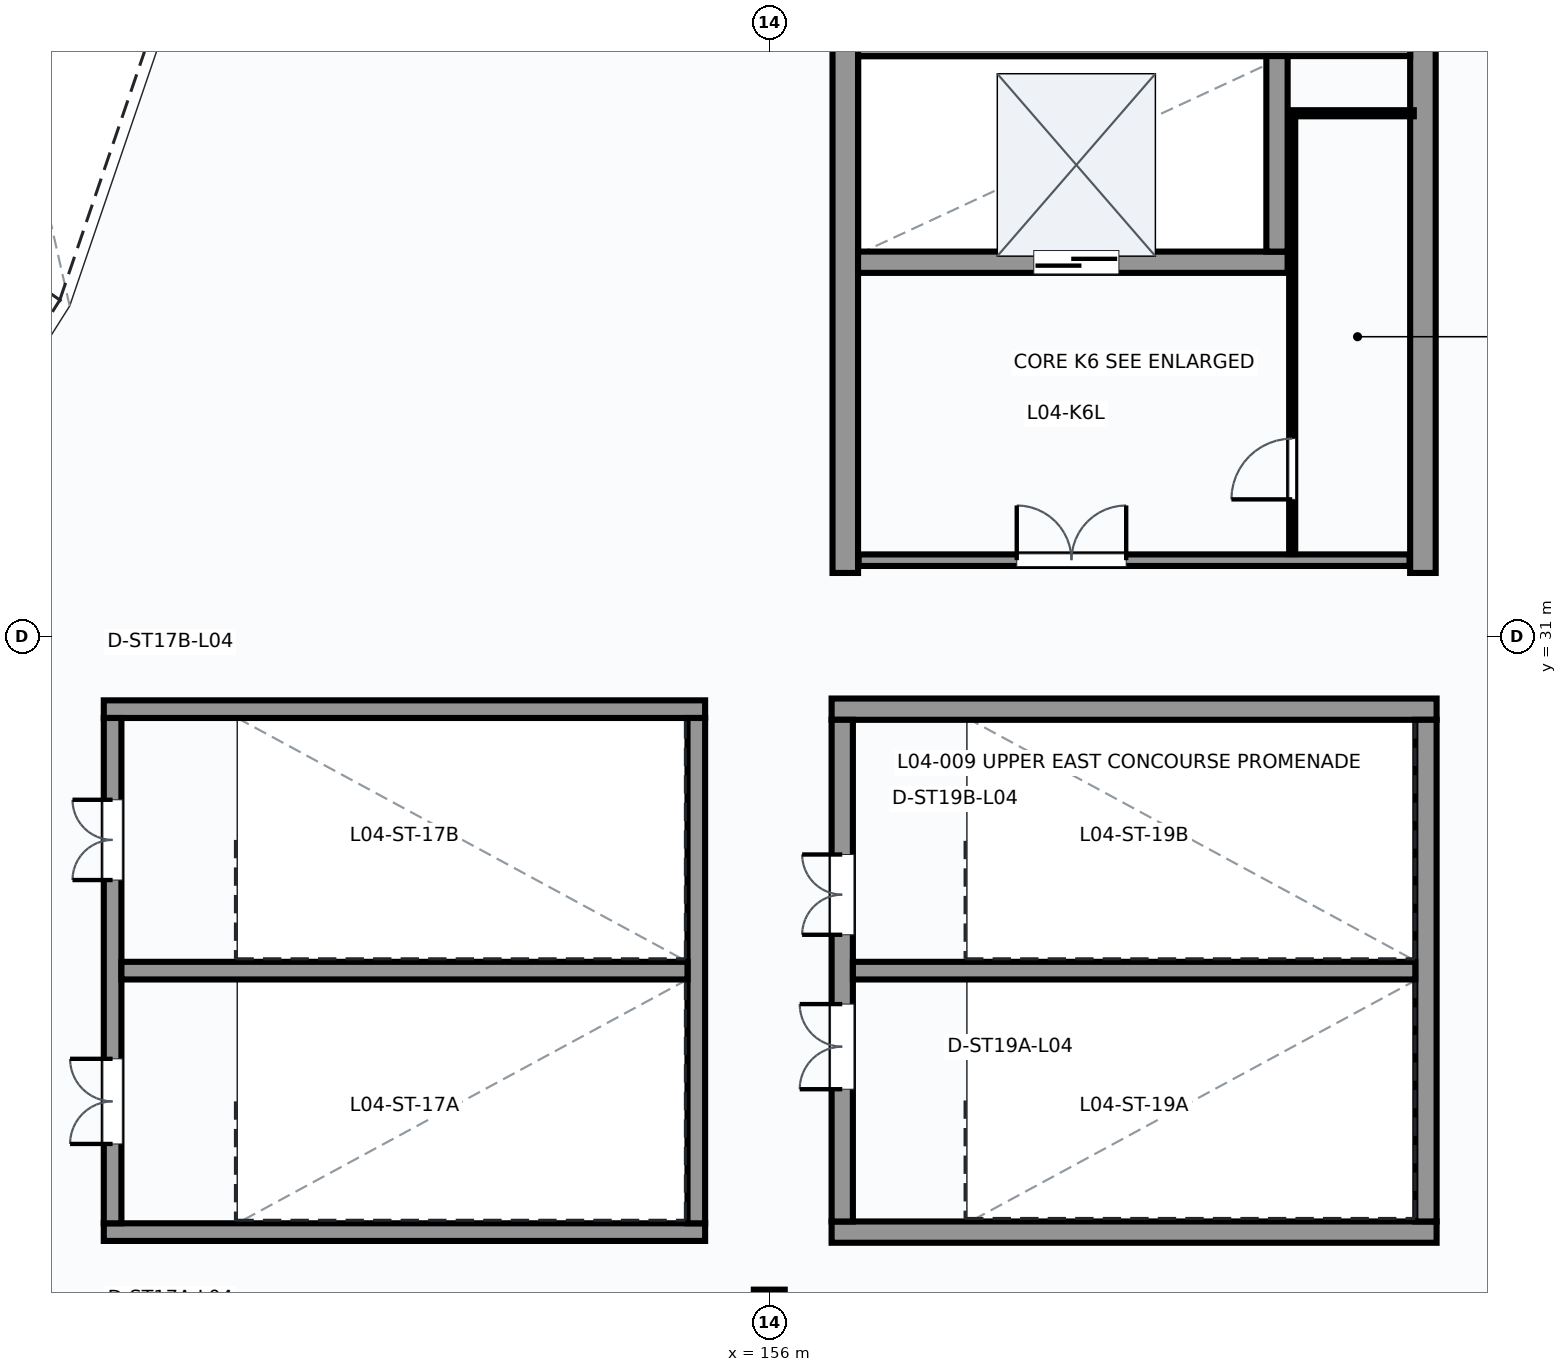
"""IFC4 building model, lengths in metres.
Left out: names, types, materials, properties, quantities, classifications, styles, units other than length and angle.
Written with IfcOpenShell. Run it as: python <this file> out.ifc"""

import sys

from ifc_helpers import new_model, si_unit, direction, frame, frame_2d, origin, origin_2d, place, context, subcontext, project, spatial, rectangle, hollow_circle, extrude, element, fill, save


model = new_model("IFC4")
c1 = context("Model", 3, precision=1e-05, world=origin(), true_north=direction((0.0, 1.0)))
c2 = subcontext(c1, "Body", "Model", "MODEL_VIEW")
j1 = project(units=[si_unit("LENGTHUNIT", "METRE"), si_unit("PLANEANGLEUNIT", "RADIAN")], contexts=[c1])
p1 = place(None, origin())
s1 = spatial("IfcSite", under=j1, at=p1, CompositionType="ELEMENT")
p2 = place(p1, origin())
s2 = spatial("IfcBuilding", under=s1, at=p2, CompositionType="ELEMENT")
p3 = place(p2, frame((0.0, 0.0, 19.2)))
s3 = spatial("IfcBuildingStorey", under=s2, at=p3, CompositionType="ELEMENT", Elevation=19.2)
p4 = place(p3, frame((156.0, 20.0, 0.0), z_axis=(0.0, 0.0, 1.0), x_axis=(1.0, 0.0, 0.0)))
e1 = element("IfcColumn", 1, at=p4, inside=s3, PredefinedType="COLUMN", context=c2, shape_type="SweptSolid", body=[
    extrude(hollow_circle(Radius=0.254, WallThickness=0.02, at=origin_2d()), origin(), (0.0, 0.0, 1.0), 5.4),
])
for number, where, z_axis, x_axis in (
    (2, (145.055, 21.2, 0.0), (0.0, 0.0, 1.0), (1.0, 0.0, 0.0)),
    (3, (145.055, 29.8, 0.0), (0.0, 0.0, 1.0), (1.0, 0.0, 0.0)),
):
    element("IfcWall", number, at=place(p3, frame(where, z_axis=z_axis, x_axis=x_axis)), inside=s3, PredefinedType="SHEAR", context=c2, shape_type="SweptSolid", body=[
        extrude(rectangle(XDim=9.89, YDim=0.29, at=frame_2d((4.945, 0.0))), origin(), (0.0, 0.0, 1.0), 5.4),
    ])
p5 = place(p3, frame((145.2, 21.345, 0.0), z_axis=(0.0, 0.0, 1.0), x_axis=(0.0, 1.0, 0.0)))
e4 = element("IfcWall", 4, at=p5, inside=s3, PredefinedType="SHEAR", context=c2, shape_type="SweptSolid", body=[
    extrude(rectangle(XDim=8.31, YDim=0.29, at=frame_2d((4.155, 0.0))), origin(), (0.0, 0.0, 1.0), 5.4),
])
p6 = place(p5, frame((1.305, 0.0, 0.0)))
e5 = element("IfcOpeningElement", 5, at=p6, cuts=e4, PredefinedType="OPENING", context=c2, shape_type="SweptSolid", body=[
    extrude(rectangle(XDim=1.4, YDim=2.2, at=frame_2d((0.7, 1.1))), frame((0.0, 0.155, 0.0), z_axis=(0.0, -1.0, 0.0), x_axis=(1.0, 0.0, 0.0)), (0.0, 0.0, 1.0), 0.31),
])
p7 = place(p5, frame((5.645, 0.0, 0.0)))
e6 = element("IfcOpeningElement", 6, at=p7, cuts=e4, PredefinedType="OPENING", context=c2, shape_type="SweptSolid", body=[
    extrude(rectangle(XDim=1.32, YDim=2.2, at=frame_2d((0.66, 1.1))), frame((0.0, 0.155, 0.0), z_axis=(0.0, -1.0, 0.0), x_axis=(1.0, 0.0, 0.0)), (0.0, 0.0, 1.0), 0.31),
])
p8 = place(p3, frame((154.8, 21.345, 0.0), z_axis=(0.0, 0.0, 1.0), x_axis=(0.0, 1.0, 0.0)))
e7 = element("IfcWall", 7, at=p8, inside=s3, PredefinedType="SHEAR", context=c2, shape_type="SweptSolid", body=[
    extrude(rectangle(XDim=8.31, YDim=0.29, at=frame_2d((4.155, 0.0))), origin(), (0.0, 0.0, 1.0), 5.4),
])
p9 = place(p3, frame((145.345, 25.5, 0.0), z_axis=(0.0, 0.0, 1.0), x_axis=(1.0, 0.0, 0.0)))
e8 = element("IfcWall", 8, at=p9, inside=s3, PredefinedType="SHEAR", context=c2, shape_type="SweptSolid", body=[
    extrude(rectangle(XDim=9.31, YDim=0.29, at=frame_2d((4.655, 0.0))), origin(), (0.0, 0.0, 1.0), 5.4),
])
for number, where, z_axis, x_axis in (
    (9, (157.025, 21.2, 0.0), (0.0, 0.0, 1.0), (1.0, 0.0, 0.0)),
    (10, (157.025, 29.8, 0.0), (0.0, 0.0, 1.0), (1.0, 0.0, 0.0)),
):
    element("IfcWall", number, at=place(p3, frame(where, z_axis=z_axis, x_axis=x_axis)), inside=s3, PredefinedType="SHEAR", context=c2, shape_type="SweptSolid", body=[
        extrude(rectangle(XDim=9.95, YDim=0.35, at=frame_2d((4.975, 0.0))), origin(), (0.0, 0.0, 1.0), 5.4),
    ])
p10 = place(p3, frame((157.2, 21.375, 0.0), z_axis=(0.0, 0.0, 1.0), x_axis=(0.0, 1.0, 0.0)))
e11 = element("IfcWall", 11, at=p10, inside=s3, PredefinedType="SHEAR", context=c2, shape_type="SweptSolid", body=[
    extrude(rectangle(XDim=8.25, YDim=0.35, at=frame_2d((4.125, 0.0))), origin(), (0.0, 0.0, 1.0), 5.4),
])
p11 = place(p10, frame((2.175, 0.0, 0.0)))
e12 = element("IfcOpeningElement", 12, at=p11, cuts=e11, PredefinedType="OPENING", context=c2, shape_type="SweptSolid", body=[
    extrude(rectangle(XDim=1.4, YDim=2.2, at=frame_2d((0.7, 1.1))), frame((0.0, 0.185, 0.0), z_axis=(0.0, -1.0, 0.0), x_axis=(1.0, 0.0, 0.0)), (0.0, 0.0, 1.0), 0.37),
])
p12 = place(p10, frame((4.715, 0.0, 0.0)))
e13 = element("IfcOpeningElement", 13, at=p12, cuts=e11, PredefinedType="OPENING", context=c2, shape_type="SweptSolid", body=[
    extrude(rectangle(XDim=1.32, YDim=2.2, at=frame_2d((0.66, 1.1))), frame((0.0, 0.185, 0.0), z_axis=(0.0, -1.0, 0.0), x_axis=(1.0, 0.0, 0.0)), (0.0, 0.0, 1.0), 0.37),
])
p13 = place(p3, frame((166.8, 21.375, 0.0), z_axis=(0.0, 0.0, 1.0), x_axis=(0.0, 1.0, 0.0)))
e14 = element("IfcWall", 14, at=p13, inside=s3, PredefinedType="SHEAR", context=c2, shape_type="SweptSolid", body=[
    extrude(rectangle(XDim=8.25, YDim=0.35, at=frame_2d((4.125, 0.0))), origin(), (0.0, 0.0, 1.0), 5.4),
])
p14 = place(p3, frame((157.375, 25.5, 0.0), z_axis=(0.0, 0.0, 1.0), x_axis=(1.0, 0.0, 0.0)))
e15 = element("IfcWall", 15, at=p14, inside=s3, PredefinedType="SHEAR", context=c2, shape_type="SweptSolid", body=[
    extrude(rectangle(XDim=9.25, YDim=0.29, at=frame_2d((4.625, 0.0))), origin(), (0.0, 0.0, 1.0), 5.4),
])
for number, where, z_axis, x_axis in (
    (16, (157.25, 32.04, 0.0), (0.0, 0.0, 1.0), (0.0, 1.0, 0.0)),
    (17, (166.75, 32.04, 0.0), (0.0, 0.0, 1.0), (0.0, 1.0, 0.0)),
):
    element("IfcWall", number, at=place(p3, frame(where, z_axis=z_axis, x_axis=x_axis)), inside=s3, PredefinedType="SHEAR", context=c2, shape_type="SweptSolid", body=[
        extrude(rectangle(XDim=8.92, YDim=0.42, at=frame_2d((4.46, 0.0))), origin(), (0.0, 0.0, 1.0), 5.4),
    ])
p15 = place(p3, frame((157.46, 40.75, 0.0), z_axis=(0.0, 0.0, 1.0), x_axis=(1.0, 0.0, 0.0)))
e18 = element("IfcWall", 18, at=p15, inside=s3, PredefinedType="SHEAR", context=c2, shape_type="SweptSolid", body=[
    extrude(rectangle(XDim=9.08, YDim=0.42, at=frame_2d((4.54, 0.0))), origin(), (0.0, 0.0, 1.0), 5.4),
])
p16 = place(p3, frame((157.46, 37.15, 0.0), z_axis=(0.0, 0.0, 1.0), x_axis=(1.0, 0.0, 0.0)))
e19 = element("IfcWall", 19, at=p16, inside=s3, PredefinedType="SHEAR", context=c2, shape_type="SweptSolid", body=[
    extrude(rectangle(XDim=7.065, YDim=0.35, at=frame_2d((3.532, 0.0))), origin(), (0.0, 0.0, 1.0), 5.4),
])
p17 = place(p16, frame((2.89, 0.0, 0.0)))
e20 = element("IfcOpeningElement", 20, at=p17, cuts=e19, PredefinedType="OPENING", context=c2, shape_type="SweptSolid", body=[
    extrude(rectangle(XDim=1.4, YDim=2.3, at=frame_2d((0.7, 1.15))), frame((0.0, 0.185, 0.0), z_axis=(0.0, -1.0, 0.0), x_axis=(1.0, 0.0, 0.0)), (0.0, 0.0, 1.0), 0.37),
])
p18 = place(p3, frame((164.35, 37.325, 0.0), z_axis=(0.0, 0.0, 1.0), x_axis=(0.0, 1.0, 0.0)))
e21 = element("IfcWall", 21, at=p18, inside=s3, PredefinedType="SHEAR", context=c2, shape_type="SweptSolid", body=[
    extrude(rectangle(XDim=3.215, YDim=0.35, at=frame_2d((1.607, 0.0))), origin(), (0.0, 0.0, 1.0), 5.4),
])
p19 = place(p3, frame((157.47, 32.25, 0.0), z_axis=(0.0, 0.0, 1.0), x_axis=(1.0, 0.0, 0.0)))
e22 = element("IfcWall", 22, at=p19, inside=s3, PredefinedType="PARTITIONING", context=c2, shape_type="SweptSolid", body=[
    extrude(rectangle(XDim=9.06, YDim=0.19, at=frame_2d((4.53, 0.0))), origin(), (0.0, 0.0, 1.0), 5.07),
])
p20 = place(p19, frame((2.6, 0.0, 0.0)))
e23 = element("IfcOpeningElement", 23, at=p20, cuts=e22, PredefinedType="OPENING", context=c2, shape_type="SweptSolid", body=[
    extrude(rectangle(XDim=1.8, YDim=2.3, at=frame_2d((0.9, 1.15))), frame((0.0, 0.105, 0.0), z_axis=(0.0, -1.0, 0.0), x_axis=(1.0, 0.0, 0.0)), (0.0, 0.0, 1.0), 0.21),
])
p21 = place(p3, frame((164.6, 32.35, 0.0), z_axis=(0.0, 0.0, 1.0), x_axis=(0.0, 1.0, 0.0)))
e24 = element("IfcWall", 24, at=p21, inside=s3, PredefinedType="PARTITIONING", context=c2, shape_type="SweptSolid", body=[
    extrude(rectangle(XDim=7.25, YDim=0.1, at=frame_2d((3.625, 0.0))), origin(), (0.0, 0.0, 1.0), 5.07),
])
p22 = place(p21, frame((0.9, 0.0, 0.0)))
e25 = element("IfcOpeningElement", 25, at=p22, cuts=e24, PredefinedType="OPENING", context=c2, shape_type="SweptSolid", body=[
    extrude(rectangle(XDim=1.0, YDim=2.1, at=frame_2d((0.5, 1.05))), frame((0.0, 0.06, 0.0), z_axis=(0.0, -1.0, 0.0), x_axis=(1.0, 0.0, 0.0)), (0.0, 0.0, 1.0), 0.12),
])
p23 = place(p3, frame((164.6, 39.6, 0.0), z_axis=(0.0, 0.0, 1.0), x_axis=(1.0, 0.0, 0.0)))
e26 = element("IfcWall", 26, at=p23, inside=s3, PredefinedType="PARTITIONING", context=c2, shape_type="SweptSolid", body=[
    extrude(rectangle(XDim=2.0, YDim=0.1, at=frame_2d((1.0, 0.0))), origin(), (0.0, 0.0, 1.0), 5.07),
])
p24 = place(p6, origin())
e27 = element("IfcDoor", 27, at=p24, inside=s3, OperationType="DOUBLE_DOOR_SINGLE_SWING", PredefinedType="DOOR", context=c2, shape_type="SweptSolid", body=[
    extrude(rectangle(XDim=1.4, YDim=2.2, at=frame_2d((0.7, 1.1))), frame((0.0, 0.025, 0.0), z_axis=(0.0, -1.0, 0.0), x_axis=(1.0, 0.0, 0.0)), (0.0, 0.0, 1.0), 0.05),
])
fill(e5, e27)
p25 = place(p7, origin())
e28 = element("IfcDoor", 28, at=p25, inside=s3, OperationType="DOUBLE_DOOR_SINGLE_SWING", PredefinedType="DOOR", context=c2, shape_type="SweptSolid", body=[
    extrude(rectangle(XDim=1.32, YDim=2.2, at=frame_2d((0.66, 1.1))), frame((0.0, 0.025, 0.0), z_axis=(0.0, -1.0, 0.0), x_axis=(1.0, 0.0, 0.0)), (0.0, 0.0, 1.0), 0.05),
])
fill(e6, e28)
p26 = place(p11, origin())
e29 = element("IfcDoor", 29, at=p26, inside=s3, OperationType="DOUBLE_DOOR_SINGLE_SWING", PredefinedType="DOOR", context=c2, shape_type="SweptSolid", body=[
    extrude(rectangle(XDim=1.4, YDim=2.2, at=frame_2d((0.7, 1.1))), frame((0.0, 0.025, 0.0), z_axis=(0.0, -1.0, 0.0), x_axis=(1.0, 0.0, 0.0)), (0.0, 0.0, 1.0), 0.05),
])
fill(e12, e29)
p27 = place(p12, origin())
e30 = element("IfcDoor", 30, at=p27, inside=s3, OperationType="DOUBLE_DOOR_SINGLE_SWING", PredefinedType="DOOR", context=c2, shape_type="SweptSolid", body=[
    extrude(rectangle(XDim=1.32, YDim=2.2, at=frame_2d((0.66, 1.1))), frame((0.0, 0.025, 0.0), z_axis=(0.0, -1.0, 0.0), x_axis=(1.0, 0.0, 0.0)), (0.0, 0.0, 1.0), 0.05),
])
fill(e13, e30)
p28 = place(p17, origin())
e31 = element("IfcDoor", 31, at=p28, inside=s3, OperationType="SLIDING_TO_LEFT", PredefinedType="DOOR", context=c2, shape_type="SweptSolid", body=[
    extrude(rectangle(XDim=1.4, YDim=2.3, at=frame_2d((0.7, 1.15))), frame((0.0, 0.025, 0.0), z_axis=(0.0, -1.0, 0.0), x_axis=(1.0, 0.0, 0.0)), (0.0, 0.0, 1.0), 0.05),
])
fill(e20, e31)
p29 = place(p20, origin())
e32 = element("IfcDoor", 32, at=p29, inside=s3, OperationType="DOUBLE_DOOR_SINGLE_SWING", PredefinedType="DOOR", context=c2, shape_type="SweptSolid", body=[
    extrude(rectangle(XDim=1.8, YDim=2.3, at=frame_2d((0.9, 1.15))), frame((0.0, 0.025, 0.0), z_axis=(0.0, -1.0, 0.0), x_axis=(1.0, 0.0, 0.0)), (0.0, 0.0, 1.0), 0.05),
])
fill(e23, e32)
p30 = place(p22, origin())
e33 = element("IfcDoor", 33, at=p30, inside=s3, OperationType="SINGLE_SWING_LEFT", PredefinedType="DOOR", context=c2, shape_type="SweptSolid", body=[
    extrude(rectangle(XDim=1.0, YDim=2.1, at=frame_2d((0.5, 1.05))), frame((0.0, 0.025, 0.0), z_axis=(0.0, -1.0, 0.0), x_axis=(1.0, 0.0, 0.0)), (0.0, 0.0, 1.0), 0.05),
])
fill(e25, e33)
save(model, sys.argv[1])
